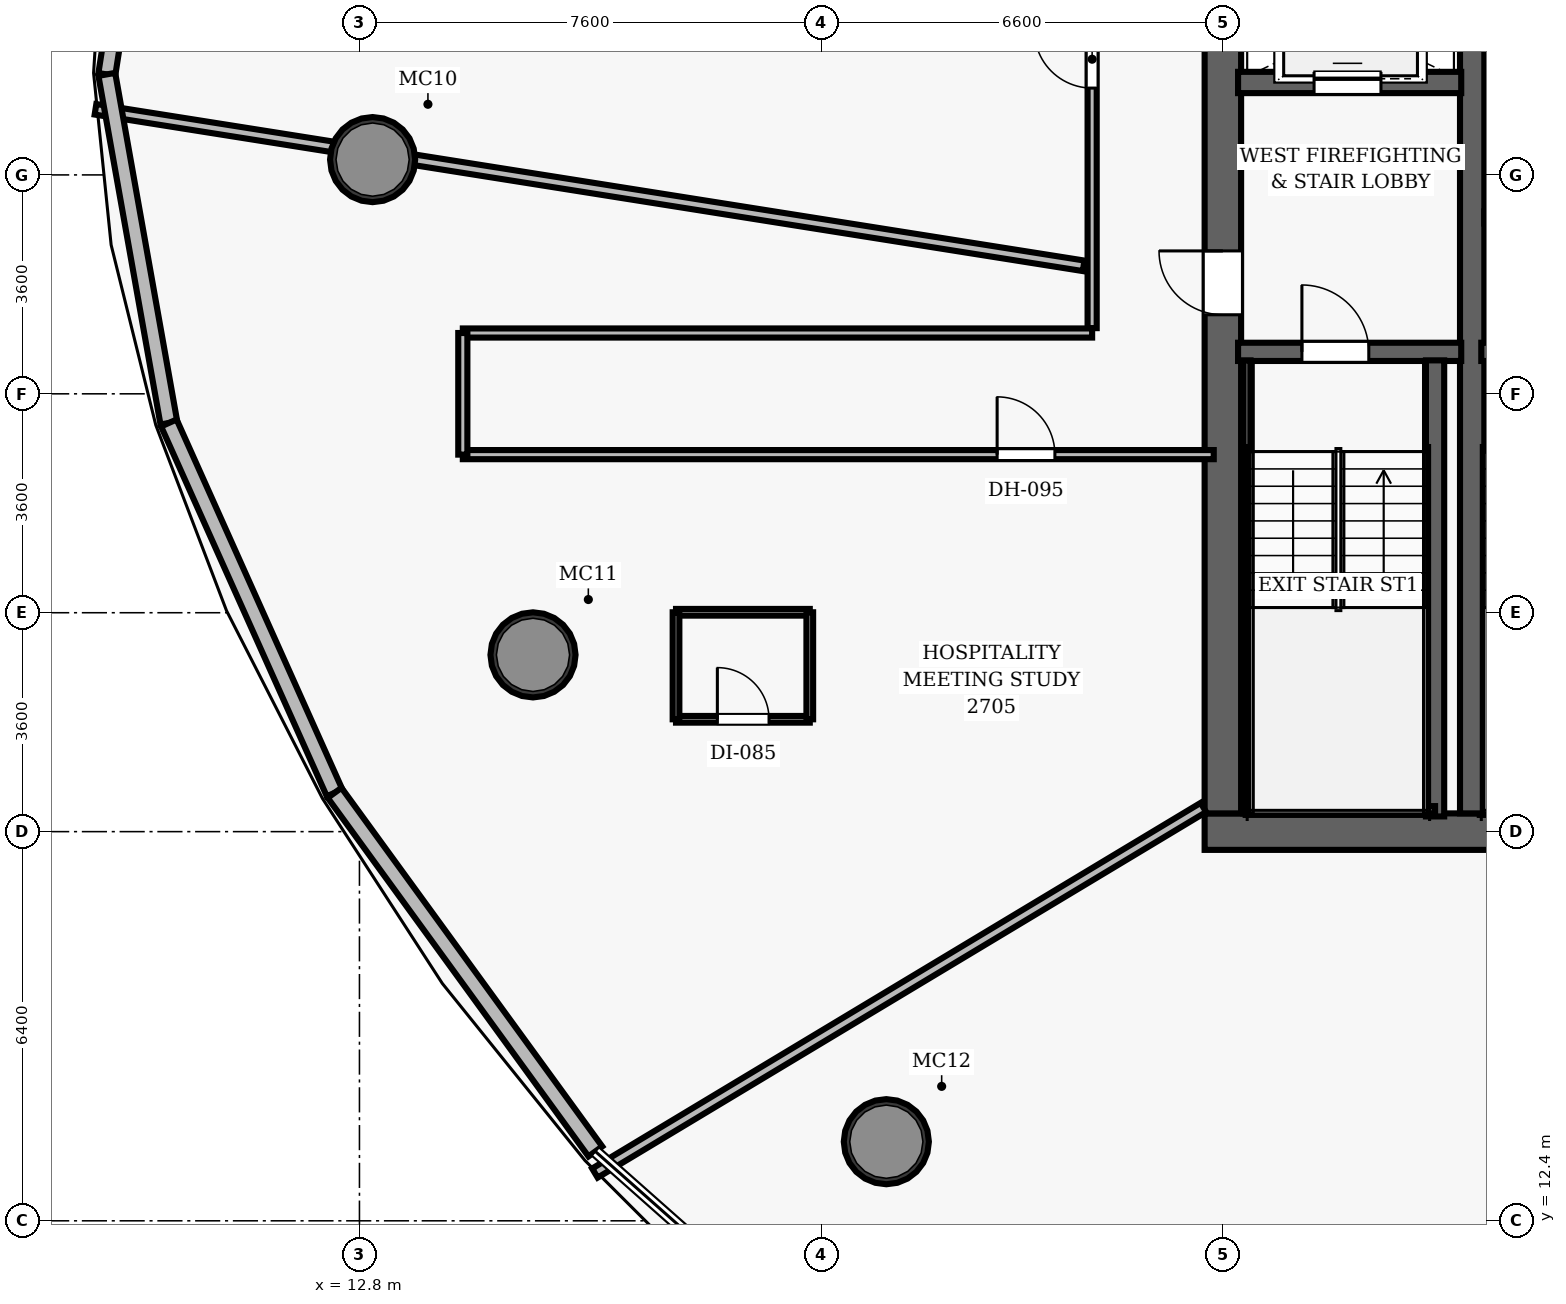
"""IFC4 building model, lengths in metres.
Left out: names, types, materials, properties, quantities, classifications, styles, units other than length and angle.
Written with IfcOpenShell. Run it as: python <this file> out.ifc"""

import sys

from ifc_helpers import new_model, si_unit, direction, frame, frame_2d, origin, origin_2d, place, context, subcontext, project, spatial, rectangle, hollow_circle, extrude, element, fill, save


model = new_model("IFC4")
c1 = context("Model", 3, precision=1e-05, world=origin(), true_north=direction((0.0, 1.0)))
c2 = subcontext(c1, "Body", "Model", "MODEL_VIEW")
j1 = project(units=[si_unit("LENGTHUNIT", "METRE"), si_unit("PLANEANGLEUNIT", "RADIAN")], contexts=[c1])
p1 = place(None, origin())
s1 = spatial("IfcSite", under=j1, at=p1, CompositionType="ELEMENT")
p2 = place(p1, origin())
s2 = spatial("IfcBuilding", under=s1, at=p2, CompositionType="ELEMENT")
p3 = place(p2, frame((0.0, 0.0, 113.3)))
s3 = spatial("IfcBuildingStorey", under=s2, at=p3, CompositionType="ELEMENT", Elevation=113.3)
p4 = place(p3, frame((26.7, 18.8, 0.0), z_axis=(0.0, 0.0, 1.0), x_axis=(1.0, 0.0, 0.0)))
e1 = element("IfcWall", 1, at=p4, inside=s3, PredefinedType="SHEAR", context=c2, shape_type="SweptSolid", body=[
    extrude(rectangle(XDim=22.6, YDim=0.6, at=frame_2d((11.3, 0.0))), origin(), (0.0, 0.0, 1.0), 3.5),
])
p5 = place(p4, frame((14.52, 0.0, 0.0)))
e2 = element("IfcOpeningElement", 2, at=p5, cuts=e1, PredefinedType="OPENING", context=c2, shape_type="SweptSolid", body=[
    extrude(rectangle(XDim=1.05, YDim=2.15, at=frame_2d((0.525, 1.075))), frame((0.0, 0.31, 0.0), z_axis=(0.0, -1.0, 0.0), x_axis=(1.0, 0.0, 0.0)), (0.0, 0.0, 1.0), 0.62),
])
p6 = place(p3, frame((27.0, 19.1, 0.0), z_axis=(0.0, 0.0, 1.0), x_axis=(0.0, 1.0, 0.0)))
e3 = element("IfcWall", 3, at=p6, inside=s3, PredefinedType="SHEAR", context=c2, shape_type="SweptSolid", body=[
    extrude(rectangle(XDim=13.8, YDim=0.6, at=frame_2d((6.9, 0.0))), origin(), (0.0, 0.0, 1.0), 3.5),
])
p7 = place(p6, frame((8.2, 0.0, 0.0)))
e4 = element("IfcOpeningElement", 4, at=p7, cuts=e3, PredefinedType="OPENING", context=c2, shape_type="SweptSolid", body=[
    extrude(rectangle(XDim=1.05, YDim=2.15, at=frame_2d((0.525, 1.075))), frame((0.0, 0.31, 0.0), z_axis=(0.0, -1.0, 0.0), x_axis=(1.0, 0.0, 0.0)), (0.0, 0.0, 1.0), 0.62),
])
p8 = place(p3, frame((31.1, 19.1, 0.0), z_axis=(0.0, 0.0, 1.0), x_axis=(0.0, 1.0, 0.0)))
e5 = element("IfcWall", 5, at=p8, inside=s3, PredefinedType="SHEAR", context=c2, shape_type="SweptSolid", body=[
    extrude(rectangle(XDim=13.8, YDim=0.4, at=frame_2d((6.9, 0.0))), origin(), (0.0, 0.0, 1.0), 3.5),
])
for number, where, z_axis, x_axis in (
    (6, (13.016, 29.852, 0.0), (0.0, 0.0, 1.0), (1.0, 0.0, 0.0)),
    (7, (15.654, 21.707, 0.0), (0.0, 0.0, 1.0), (1.0, 0.0, 0.0)),
    (8, (21.465, 13.701, 0.0), (0.0, 0.0, 1.0), (1.0, 0.0, 0.0)),
):
    element("IfcColumn", number, at=place(p3, frame(where, z_axis=z_axis, x_axis=x_axis)), inside=s3, PredefinedType="COLUMN", context=c2, shape_type="SweptSolid", body=[
        extrude(hollow_circle(Radius=0.7, WallThickness=0.055, at=origin_2d()), origin(), (0.0, 0.0, 1.0), 3.5),
    ])
p9 = place(p3, frame((27.25, 26.69, 0.0), z_axis=(0.0, 0.0, 1.0), x_axis=(1.0, 0.0, 0.0)))
e9 = element("IfcWall", 9, at=p9, inside=s3, PredefinedType="SHEAR", context=c2, shape_type="SweptSolid", body=[
    extrude(rectangle(XDim=3.67, YDim=0.3, at=frame_2d((1.835, 0.0))), origin(), (0.0, 0.0, 1.0), 3.5),
])
p10 = place(p9, frame((1.05, 0.0, 0.0)))
e10 = element("IfcOpeningElement", 10, at=p10, cuts=e9, PredefinedType="OPENING", context=c2, shape_type="SweptSolid", body=[
    extrude(rectangle(XDim=1.1, YDim=2.15, at=frame_2d((0.55, 1.075))), frame((0.0, 0.16, 0.0), z_axis=(0.0, -1.0, 0.0), x_axis=(1.0, 0.0, 0.0)), (0.0, 0.0, 1.0), 0.32),
])
p11 = place(p3, frame((30.49, 19.05, 0.0), z_axis=(0.0, 0.0, 1.0), x_axis=(0.0, 1.0, 0.0)))
e11 = element("IfcWall", 11, at=p11, inside=s3, PredefinedType="SHEAR", context=c2, shape_type="SweptSolid", body=[
    extrude(rectangle(XDim=7.5, YDim=0.3, at=frame_2d((3.75, 0.0))), origin(), (0.0, 0.0, 1.0), 3.5),
])
p12 = place(p3, frame((27.395, 19.1, 0.0), z_axis=(0.0, 0.0, 1.0), x_axis=(0.0, 1.0, 0.0)))
e12 = element("IfcWall", 12, at=p12, inside=s3, PredefinedType="SHEAR", context=c2, shape_type="SweptSolid", body=[
    extrude(rectangle(XDim=7.45, YDim=0.12, at=frame_2d((3.725, 0.0))), origin(), (0.0, 0.0, 1.0), 3.5),
])
p13 = place(p3, frame((27.395, 19.16, 0.0), z_axis=(0.0, 0.0, 1.0), x_axis=(1.0, 0.0, 0.0)))
e13 = element("IfcWall", 13, at=p13, inside=s3, PredefinedType="SHEAR", context=c2, shape_type="SweptSolid", body=[
    extrude(rectangle(XDim=3.095, YDim=0.12, at=frame_2d((1.547, 0.0))), origin(), (0.0, 0.0, 1.0), 3.5),
])
p14 = place(p3, frame((27.25, 31.12, 0.0), z_axis=(0.0, 0.0, 1.0), x_axis=(1.0, 0.0, 0.0)))
e14 = element("IfcWall", 14, at=p14, inside=s3, PredefinedType="SHEAR", context=c2, shape_type="SweptSolid", body=[
    extrude(rectangle(XDim=3.67, YDim=0.35, at=frame_2d((1.835, 0.0))), origin(), (0.0, 0.0, 1.0), 2.675),
])
p15 = place(p14, frame((1.25, 0.0, 0.0)))
e15 = element("IfcOpeningElement", 15, at=p15, cuts=e14, PredefinedType="OPENING", context=c2, shape_type="SweptSolid", body=[
    extrude(rectangle(XDim=1.1, YDim=2.15, at=frame_2d((0.55, 1.075))), frame((0.0, 0.185, 0.0), z_axis=(0.0, -1.0, 0.0), x_axis=(1.0, 0.0, 0.0)), (0.0, 0.0, 1.0), 0.37),
])
p16 = place(p3, frame((31.25, 26.69, 0.0), z_axis=(0.0, 0.0, 1.0), x_axis=(1.0, 0.0, 0.0)))
e16 = element("IfcWall", 16, at=p16, inside=s3, PredefinedType="SHEAR", context=c2, shape_type="SweptSolid", body=[
    extrude(rectangle(XDim=3.56, YDim=0.3, at=frame_2d((1.78, 0.0))), origin(), (0.0, 0.0, 1.0), 3.5),
])
p17 = place(p16, frame((1.55, 0.0, 0.0)))
e17 = element("IfcOpeningElement", 17, at=p17, cuts=e16, PredefinedType="OPENING", context=c2, shape_type="SweptSolid", body=[
    extrude(rectangle(XDim=1.1, YDim=2.15, at=frame_2d((0.55, 1.075))), frame((0.0, 0.16, 0.0), z_axis=(0.0, -1.0, 0.0), x_axis=(1.0, 0.0, 0.0)), (0.0, 0.0, 1.0), 0.32),
])
p18 = place(p3, frame((31.3, 19.16, 0.0), z_axis=(0.0, 0.0, 1.0), x_axis=(1.0, 0.0, 0.0)))
e18 = element("IfcWall", 18, at=p18, inside=s3, PredefinedType="SHEAR", context=c2, shape_type="SweptSolid", body=[
    extrude(rectangle(XDim=3.04, YDim=0.12, at=frame_2d((1.52, 0.0))), origin(), (0.0, 0.0, 1.0), 3.5),
])
p19 = place(p3, frame((31.3, 28.9, 0.0), z_axis=(0.0, 0.0, 1.0), x_axis=(1.0, 0.0, 0.0)))
e19 = element("IfcWall", 19, at=p19, inside=s3, PredefinedType="PARTITIONING", context=c2, shape_type="SweptSolid", body=[
    extrude(rectangle(XDim=1.12, YDim=0.2, at=frame_2d((0.56, 0.0))), origin(), (0.0, 0.0, 1.0), 2.675),
])
p20 = place(p3, frame((24.85, 27.08, 0.0), z_axis=(0.0, 0.0, 1.0), x_axis=(0.0, 1.0, 0.0)))
e20 = element("IfcWall", 20, at=p20, inside=s3, PredefinedType="PARTITIONING", context=c2, shape_type="SweptSolid", body=[
    extrude(rectangle(XDim=8.12, YDim=0.15, at=frame_2d((4.06, 0.0))), origin(), (0.0, 0.0, 1.0), 2.675),
])
p21 = place(p20, frame((3.948, 0.0, 0.0)))
e21 = element("IfcOpeningElement", 21, at=p21, cuts=e20, PredefinedType="OPENING", context=c2, shape_type="SweptSolid", body=[
    extrude(rectangle(XDim=0.95, YDim=2.15, at=frame_2d((0.475, 1.075))), frame((0.0, 0.085, 0.0), z_axis=(0.0, -1.0, 0.0), x_axis=(1.0, 0.0, 0.0)), (0.0, 0.0, 1.0), 0.17),
])
p22 = place(p3, frame((14.5, 27.0, 0.0), z_axis=(0.0, 0.0, 1.0), x_axis=(1.0, 0.0, 0.0)))
e22 = element("IfcWall", 22, at=p22, inside=s3, PredefinedType="PARTITIONING", context=c2, shape_type="SweptSolid", body=[
    extrude(rectangle(XDim=10.35, YDim=0.15, at=frame_2d((5.175, 0.0))), origin(), (0.0, 0.0, 1.0), 2.675),
])
p23 = place(p3, frame((14.5, 25.0, 0.0), z_axis=(0.0, 0.0, 1.0), x_axis=(1.0, 0.0, 0.0)))
e23 = element("IfcWall", 23, at=p23, inside=s3, PredefinedType="PARTITIONING", context=c2, shape_type="SweptSolid", body=[
    extrude(rectangle(XDim=12.35, YDim=0.15, at=frame_2d((6.175, 0.0))), origin(), (0.0, 0.0, 1.0), 2.675),
])
p24 = place(p23, frame((8.788, 0.0, 0.0)))
e24 = element("IfcOpeningElement", 24, at=p24, cuts=e23, PredefinedType="OPENING", context=c2, shape_type="SweptSolid", body=[
    extrude(rectangle(XDim=0.95, YDim=2.15, at=frame_2d((0.475, 1.075))), frame((0.0, 0.085, 0.0), z_axis=(0.0, -1.0, 0.0), x_axis=(1.0, 0.0, 0.0)), (0.0, 0.0, 1.0), 0.17),
])
p25 = place(p3, frame((14.5, 25.0, 0.0), z_axis=(0.0, 0.0, 1.0), x_axis=(0.0, 1.0, 0.0)))
e25 = element("IfcWall", 25, at=p25, inside=s3, PredefinedType="PARTITIONING", context=c2, shape_type="SweptSolid", body=[
    extrude(rectangle(XDim=2.0, YDim=0.15, at=frame_2d((1.0, 0.0))), origin(), (0.0, 0.0, 1.0), 2.675),
])
p26 = place(p3, frame((24.71, 28.105, 0.0), z_axis=(0.0, 0.0, 1.0), x_axis=(-0.98768802025, 0.156436487606, 0.0)))
e26 = element("IfcWall", 26, at=p26, inside=s3, PredefinedType="PARTITIONING", context=c2, shape_type="SweptSolid", body=[
    extrude(rectangle(XDim=16.454, YDim=0.175, at=frame_2d((8.227, 0.0))), origin(), (0.0, 0.0, 1.0), 2.675),
])
p27 = place(p3, frame((26.68, 19.198, 0.0), z_axis=(0.0, 0.0, 1.0), x_axis=(-0.85716617106, -0.515039954946, 0.0)))
e27 = element("IfcWall", 27, at=p27, inside=s3, PredefinedType="PARTITIONING", context=c2, shape_type="SweptSolid", body=[
    extrude(rectangle(XDim=11.675, YDim=0.175, at=frame_2d((5.838, 0.0))), origin(), (0.0, 0.0, 1.0), 2.675),
])
p28 = place(p3, frame((35.411, 18.48, 0.0), z_axis=(0.0, 0.0, 1.0), x_axis=(-0.325564767914, -0.945519741673, 0.0)))
e28 = element("IfcWall", 28, at=p28, inside=s3, PredefinedType="PARTITIONING", context=c2, shape_type="SweptSolid", body=[
    extrude(rectangle(XDim=14.981, YDim=0.175, at=frame_2d((7.491, 0.0))), origin(), (0.0, 0.0, 1.0), 2.675),
])
p29 = place(p3, frame((18.006, 20.647, 0.0), z_axis=(0.0, 0.0, 1.0), x_axis=(1.0, 0.0, 0.0)))
e29 = element("IfcWall", 29, at=p29, inside=s3, PredefinedType="PARTITIONING", context=c2, shape_type="SweptSolid", body=[
    extrude(rectangle(XDim=2.2, YDim=0.11, at=frame_2d((1.1, 0.0))), origin(), (0.0, 0.0, 1.0), 2.675),
])
p30 = place(p29, frame((0.68, 0.0, 0.0)))
e30 = element("IfcOpeningElement", 30, at=p30, cuts=e29, PredefinedType="OPENING", context=c2, shape_type="SweptSolid", body=[
    extrude(rectangle(XDim=0.85, YDim=2.1, at=frame_2d((0.425, 1.05))), frame((0.0, 0.065, 0.0), z_axis=(0.0, -1.0, 0.0), x_axis=(1.0, 0.0, 0.0)), (0.0, 0.0, 1.0), 0.13),
])
p31 = place(p3, frame((18.006, 22.407, 0.0), z_axis=(0.0, 0.0, 1.0), x_axis=(1.0, 0.0, 0.0)))
e31 = element("IfcWall", 31, at=p31, inside=s3, PredefinedType="PARTITIONING", context=c2, shape_type="SweptSolid", body=[
    extrude(rectangle(XDim=2.2, YDim=0.11, at=frame_2d((1.1, 0.0))), origin(), (0.0, 0.0, 1.0), 2.675),
])
for number, where, z_axis, x_axis in (
    (32, (18.006, 20.647, 0.0), (0.0, 0.0, 1.0), (0.0, 1.0, 0.0)),
    (33, (20.206, 20.647, 0.0), (0.0, 0.0, 1.0), (0.0, 1.0, 0.0)),
):
    element("IfcWall", number, at=place(p3, frame(where, z_axis=z_axis, x_axis=x_axis)), inside=s3, PredefinedType="PARTITIONING", context=c2, shape_type="SweptSolid", body=[
        extrude(rectangle(XDim=1.76, YDim=0.11, at=frame_2d((0.88, 0.0))), origin(), (0.0, 0.0, 1.0), 2.675),
    ])
p32 = place(p3, frame((8.645, 31.253, 0.0), z_axis=(0.0, 0.0, 1.0), x_axis=(0.154237267415, 0.988033838156, 0.0)))
e34 = element("IfcWall", 34, at=p32, inside=s3, PredefinedType="SOLIDWALL", context=c2, shape_type="SweptSolid", body=[
    extrude(rectangle(XDim=5.175, YDim=0.28, at=frame_2d((2.587, 0.0))), origin(), (0.0, 0.0, 1.0), 3.26),
])
p33 = place(p3, frame((9.666, 25.521, 0.0), z_axis=(0.0, 0.0, 1.0), x_axis=(-0.175260935911, 0.984522018212, 0.0)))
e35 = element("IfcWall", 35, at=p33, inside=s3, PredefinedType="SOLIDWALL", context=c2, shape_type="SweptSolid", body=[
    extrude(rectangle(XDim=5.823, YDim=0.28, at=frame_2d((2.911, 0.0))), origin(), (0.0, 0.0, 1.0), 3.26),
])
p34 = place(p3, frame((12.391, 19.438, 0.0), z_axis=(0.0, 0.0, 1.0), x_axis=(-0.408937052671, 0.912562593444, 0.0)))
e36 = element("IfcWall", 36, at=p34, inside=s3, PredefinedType="SOLIDWALL", context=c2, shape_type="SweptSolid", body=[
    extrude(rectangle(XDim=6.665, YDim=0.28, at=frame_2d((3.333, 0.0))), origin(), (0.0, 0.0, 1.0), 3.26),
])
p35 = place(p3, frame((16.679, 13.541, 0.0), z_axis=(0.0, 0.0, 1.0), x_axis=(-0.588105999216, 0.808783860921, 0.0)))
e37 = element("IfcWall", 37, at=p35, inside=s3, PredefinedType="SOLIDWALL", context=c2, shape_type="SweptSolid", body=[
    extrude(rectangle(XDim=7.292, YDim=0.28, at=frame_2d((3.646, 0.0))), origin(), (0.0, 0.0, 1.0), 3.26),
])
p36 = place(p10, origin())
e38 = element("IfcDoor", 38, at=p36, inside=s3, OperationType="SINGLE_SWING_LEFT", PredefinedType="DOOR", context=c2, shape_type="SweptSolid", body=[
    extrude(rectangle(XDim=1.1, YDim=2.15, at=frame_2d((0.55, 1.075))), frame((0.0, 0.025, 0.0), z_axis=(0.0, -1.0, 0.0), x_axis=(1.0, 0.0, 0.0)), (0.0, 0.0, 1.0), 0.05),
])
fill(e10, e38)
p37 = place(p7, origin())
e39 = element("IfcDoor", 39, at=p37, inside=s3, OperationType="SINGLE_SWING_RIGHT", PredefinedType="DOOR", context=c2, shape_type="SweptSolid", body=[
    extrude(rectangle(XDim=1.05, YDim=2.15, at=frame_2d((0.525, 1.075))), frame((0.0, 0.025, 0.0), z_axis=(0.0, -1.0, 0.0), x_axis=(1.0, 0.0, 0.0)), (0.0, 0.0, 1.0), 0.05),
])
fill(e4, e39)
p38 = place(p21, origin())
e40 = element("IfcDoor", 40, at=p38, inside=s3, OperationType="SINGLE_SWING_RIGHT", PredefinedType="DOOR", context=c2, shape_type="SweptSolid", body=[
    extrude(rectangle(XDim=0.95, YDim=2.15, at=frame_2d((0.475, 1.075))), frame((0.0, 0.025, 0.0), z_axis=(0.0, -1.0, 0.0), x_axis=(1.0, 0.0, 0.0)), (0.0, 0.0, 1.0), 0.05),
])
fill(e21, e40)
p39 = place(p24, origin())
e41 = element("IfcDoor", 41, at=p39, inside=s3, OperationType="SINGLE_SWING_LEFT", PredefinedType="DOOR", context=c2, shape_type="SweptSolid", body=[
    extrude(rectangle(XDim=0.95, YDim=2.15, at=frame_2d((0.475, 1.075))), frame((0.0, 0.025, 0.0), z_axis=(0.0, -1.0, 0.0), x_axis=(1.0, 0.0, 0.0)), (0.0, 0.0, 1.0), 0.05),
])
fill(e24, e41)
p40 = place(p30, origin())
e42 = element("IfcDoor", 42, at=p40, inside=s3, OperationType="SINGLE_SWING_LEFT", PredefinedType="DOOR", context=c2, shape_type="SweptSolid", body=[
    extrude(rectangle(XDim=0.85, YDim=2.1, at=frame_2d((0.425, 1.05))), frame((0.0, 0.025, 0.0), z_axis=(0.0, -1.0, 0.0), x_axis=(1.0, 0.0, 0.0)), (0.0, 0.0, 1.0), 0.05),
])
fill(e30, e42)
p41 = place(p15, origin())
e43 = element("IfcDoor", 43, at=p41, inside=s3, OperationType="SLIDING_TO_LEFT", PredefinedType="DOOR", context=c2, shape_type="SweptSolid", body=[
    extrude(rectangle(XDim=1.1, YDim=2.15, at=frame_2d((0.55, 1.075))), frame((0.0, 0.025, 0.0), z_axis=(0.0, -1.0, 0.0), x_axis=(1.0, 0.0, 0.0)), (0.0, 0.0, 1.0), 0.05),
])
fill(e15, e43)
save(model, sys.argv[1])
